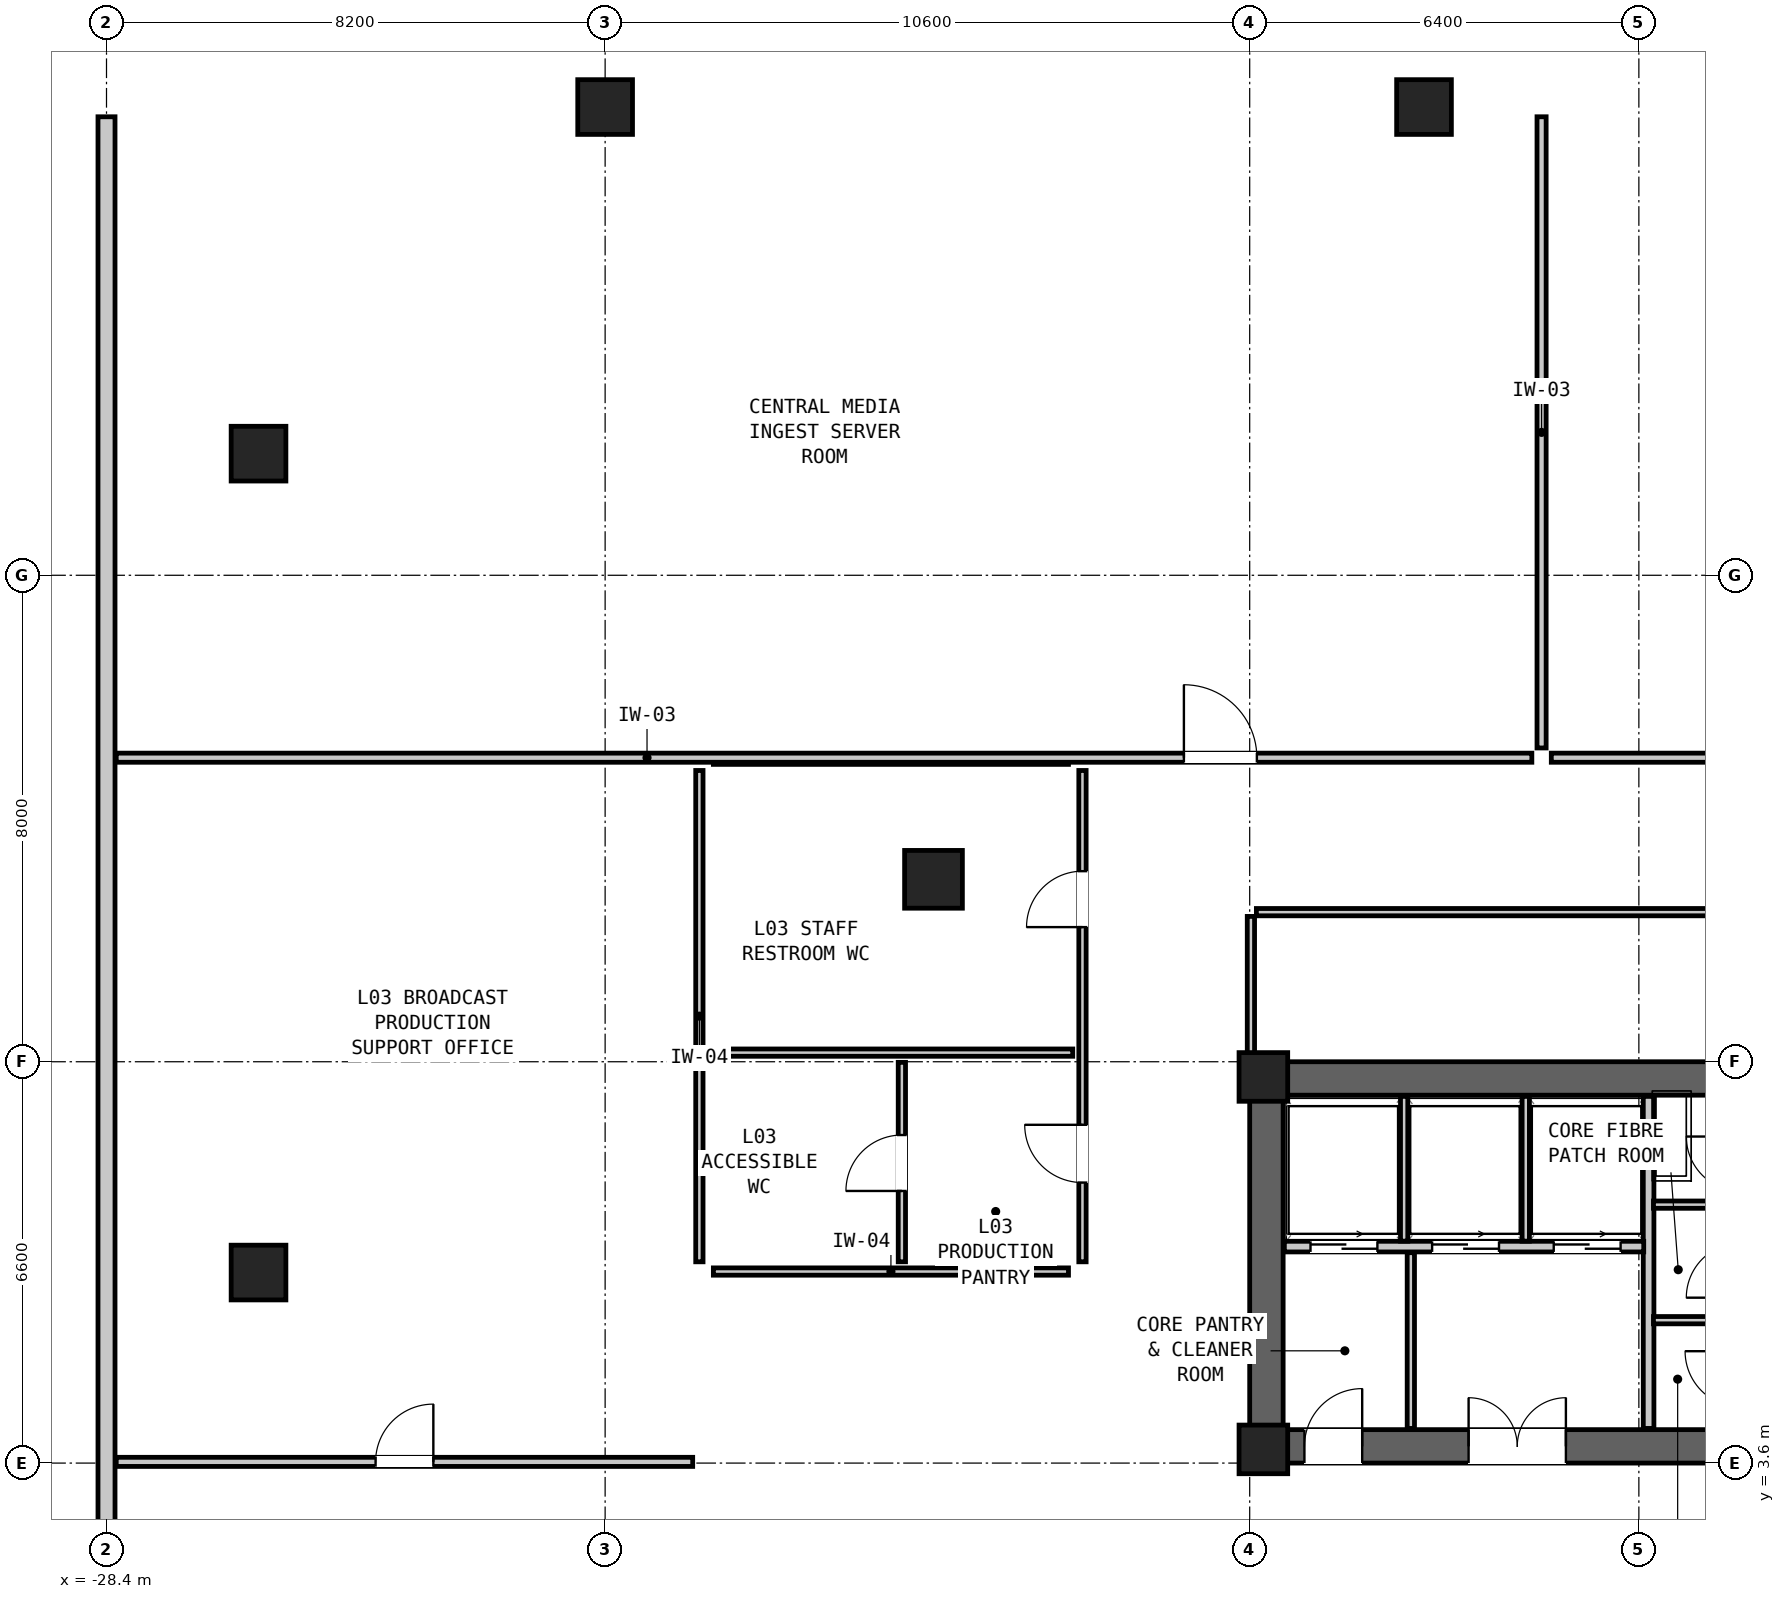
"""IFC4 building model, lengths in metres.
Left out: names, types, materials, properties, quantities, classifications, styles, units other than length and angle.
Written with IfcOpenShell. Run it as: python <this file> out.ifc"""

import sys

from ifc_helpers import new_model, si_unit, direction, frame, frame_2d, origin, origin_2d, place, context, subcontext, project, spatial, rectangle, hollow_rectangle, extrude, element, fill, save


model = new_model("IFC4")
c1 = context("Model", 3, precision=1e-05, world=origin(), true_north=direction((0.0, 1.0)))
c2 = subcontext(c1, "Body", "Model", "MODEL_VIEW")
j1 = project(units=[si_unit("LENGTHUNIT", "METRE"), si_unit("PLANEANGLEUNIT", "RADIAN")], contexts=[c1])
p1 = place(None, origin())
s1 = spatial("IfcSite", under=j1, at=p1, CompositionType="ELEMENT")
p2 = place(p1, origin())
s2 = spatial("IfcBuilding", under=s1, at=p2, CompositionType="ELEMENT")
p3 = place(p2, frame((0.0, 0.0, 13.5)))
s3 = spatial("IfcBuildingStorey", under=s2, at=p3, CompositionType="ELEMENT", Elevation=13.5)
p4 = place(p3, frame((-9.6, 9.925, 0.0), z_axis=(0.0, 0.0, 1.0), x_axis=(1.0, 0.0, 0.0)))
e1 = element("IfcWall", 1, at=p4, inside=s3, PredefinedType="SHEAR", context=c2, shape_type="SweptSolid", body=[
    extrude(rectangle(XDim=19.2, YDim=0.55, at=frame_2d((9.6, 0.0))), origin(), (0.0, 0.0, 1.0), 4.2),
])
p5 = place(p3, frame((-9.6, 3.875, 0.0), z_axis=(0.0, 0.0, 1.0), x_axis=(1.0, 0.0, 0.0)))
e2 = element("IfcWall", 2, at=p5, inside=s3, PredefinedType="SHEAR", context=c2, shape_type="SweptSolid", body=[
    extrude(rectangle(XDim=19.2, YDim=0.55, at=frame_2d((9.6, 0.0))), origin(), (0.0, 0.0, 1.0), 4.2),
])
p6 = place(p5, frame((14.2, 0.0, 0.0)))
e3 = element("IfcOpeningElement", 3, at=p6, cuts=e2, PredefinedType="OPENING", context=c2, shape_type="SweptSolid", body=[
    extrude(rectangle(XDim=1.1, YDim=2.08, at=frame_2d((0.55, 1.04))), frame((0.0, 0.287, 0.0), z_axis=(0.0, -1.0, 0.0), x_axis=(1.0, 0.0, 0.0)), (0.0, 0.0, 1.0), 0.574),
])
p7 = place(p5, frame((8.2, 0.0, 0.0)))
e4 = element("IfcOpeningElement", 4, at=p7, cuts=e2, PredefinedType="OPENING", context=c2, shape_type="SweptSolid", body=[
    extrude(rectangle(XDim=1.15, YDim=2.1, at=frame_2d((0.575, 1.05))), frame((0.0, 0.287, 0.0), z_axis=(0.0, -1.0, 0.0), x_axis=(1.0, 0.0, 0.0)), (0.0, 0.0, 1.0), 0.574),
])
p8 = place(p5, frame((0.9, 0.0, 0.0)))
e5 = element("IfcOpeningElement", 5, at=p8, cuts=e2, PredefinedType="OPENING", context=c2, shape_type="SweptSolid", body=[
    extrude(rectangle(XDim=0.95, YDim=2.1, at=frame_2d((0.475, 1.05))), frame((0.0, 0.287, 0.0), z_axis=(0.0, -1.0, 0.0), x_axis=(1.0, 0.0, 0.0)), (0.0, 0.0, 1.0), 0.574),
])
p9 = place(p5, frame((3.6, 0.0, 0.0)))
e6 = element("IfcOpeningElement", 6, at=p9, cuts=e2, PredefinedType="OPENING", context=c2, shape_type="SweptSolid", body=[
    extrude(rectangle(XDim=1.6, YDim=2.12, at=frame_2d((0.8, 1.06))), frame((0.0, 0.287, 0.0), z_axis=(0.0, -1.0, 0.0), x_axis=(1.0, 0.0, 0.0)), (0.0, 0.0, 1.0), 0.574),
])
p10 = place(p3, frame((-9.325, 3.6, 0.0), z_axis=(0.0, 0.0, 1.0), x_axis=(0.0, 1.0, 0.0)))
e7 = element("IfcWall", 7, at=p10, inside=s3, PredefinedType="SHEAR", context=c2, shape_type="SweptSolid", body=[
    extrude(rectangle(XDim=6.6, YDim=0.55, at=frame_2d((3.3, 0.0))), origin(), (0.0, 0.0, 1.0), 4.2),
])
p11 = place(p3, frame((-14.8, 13.2, 0.0), z_axis=(0.0, 0.0, 1.0), x_axis=(1.0, 0.0, 0.0)))
e8 = element("IfcColumn", 8, at=p11, inside=s3, PredefinedType="COLUMN", context=c2, shape_type="SweptSolid", body=[
    extrude(hollow_rectangle(XDim=0.95, YDim=0.95, WallThickness=0.06, at=origin_2d()), origin(), (0.0, 0.0, 1.0), 4.2),
])
for number, where, z_axis, x_axis in (
    (9, (-6.733, 25.9, 0.0), (0.0, 0.0, 1.0), (1.0, 0.0, 0.0)),
    (10, (-20.2, 25.9, 0.0), (0.0, 0.0, 1.0), (1.0, 0.0, 0.0)),
    (11, (-25.9, 20.2, 0.0), (0.0, 0.0, 1.0), (0.0, 1.0, 0.0)),
    (12, (-25.9, 6.733, 0.0), (0.0, 0.0, 1.0), (0.0, 1.0, 0.0)),
):
    element("IfcColumn", number, at=place(p3, frame(where, z_axis=z_axis, x_axis=x_axis)), inside=s3, PredefinedType="COLUMN", context=c2, shape_type="SweptSolid", body=[
        extrude(hollow_rectangle(XDim=0.9, YDim=0.9, WallThickness=0.055, at=origin_2d()), origin(), (0.0, 0.0, 1.0), 4.2),
    ])
for number, where, z_axis, x_axis in (
    (13, (-9.375, 9.95, 0.0), (0.0, 0.0, 1.0), (1.0, 0.0, 0.0)),
    (14, (-9.375, 3.825, 0.0), (0.0, 0.0, 1.0), (1.0, 0.0, 0.0)),
):
    element("IfcColumn", number, at=place(p3, frame(where, z_axis=z_axis, x_axis=x_axis)), inside=s3, PredefinedType="COLUMN", context=c2, shape_type="SweptSolid", body=[
        extrude(rectangle(XDim=0.8, YDim=0.8, at=origin_2d()), origin(), (0.0, 0.0, 1.0), 4.2),
    ])
p12 = place(p3, frame((-3.04, 4.17, 0.0), z_axis=(0.0, 0.0, 1.0), x_axis=(0.0, 1.0, 0.0)))
e15 = element("IfcWall", 15, at=p12, inside=s3, PredefinedType="PARTITIONING", context=c2, shape_type="SweptSolid", body=[
    extrude(rectangle(XDim=5.46, YDim=0.175, at=frame_2d((2.73, 0.0))), origin(), (0.0, 0.0, 1.0), 3.88),
])
for number, where, z_axis, x_axis in (
    (16, (-2.96, 5.95, 0.0), (0.0, 0.0, 1.0), (1.0, 0.0, 0.0)),
    (17, (-2.96, 7.85, 0.0), (0.0, 0.0, 1.0), (1.0, 0.0, 0.0)),
):
    element("IfcWall", number, at=place(p3, frame(where, z_axis=z_axis, x_axis=x_axis)), inside=s3, PredefinedType="PARTITIONING", context=c2, shape_type="SweptSolid", body=[
        extrude(rectangle(XDim=1.36, YDim=0.12, at=frame_2d((0.68, 0.0))), origin(), (0.0, 0.0, 1.0), 3.88),
    ])
p13 = place(p3, frame((-9.03, 7.16, 0.0), z_axis=(0.0, 0.0, 1.0), x_axis=(1.0, 0.0, 0.0)))
e18 = element("IfcWall", 18, at=p13, inside=s3, PredefinedType="PARTITIONING", context=c2, shape_type="SweptSolid", body=[
    extrude(rectangle(XDim=5.91, YDim=0.175, at=frame_2d((2.955, 0.0))), origin(), (0.0, 0.0, 1.0), 3.88),
])
p14 = place(p13, frame((0.43, 0.0, 0.0)))
e19 = element("IfcOpeningElement", 19, at=p14, cuts=e18, PredefinedType="OPENING", context=c2, shape_type="SweptSolid", body=[
    extrude(rectangle(XDim=1.1, YDim=2.06, at=frame_2d((0.55, 1.03))), frame((0.0, 0.1, 0.0), z_axis=(0.0, -1.0, 0.0), x_axis=(1.0, 0.0, 0.0)), (0.0, 0.0, 1.0), 0.199),
])
p15 = place(p13, frame((2.43, 0.0, 0.0)))
e20 = element("IfcOpeningElement", 20, at=p15, cuts=e18, PredefinedType="OPENING", context=c2, shape_type="SweptSolid", body=[
    extrude(rectangle(XDim=1.1, YDim=2.06, at=frame_2d((0.55, 1.03))), frame((0.0, 0.1, 0.0), z_axis=(0.0, -1.0, 0.0), x_axis=(1.0, 0.0, 0.0)), (0.0, 0.0, 1.0), 0.199),
])
p16 = place(p13, frame((4.43, 0.0, 0.0)))
e21 = element("IfcOpeningElement", 21, at=p16, cuts=e18, PredefinedType="OPENING", context=c2, shape_type="SweptSolid", body=[
    extrude(rectangle(XDim=1.1, YDim=2.06, at=frame_2d((0.55, 1.03))), frame((0.0, 0.1, 0.0), z_axis=(0.0, -1.0, 0.0), x_axis=(1.0, 0.0, 0.0)), (0.0, 0.0, 1.0), 0.199),
])
for number, where, z_axis, x_axis in (
    (22, (-7.06, 7.25, 0.0), (0.0, 0.0, 1.0), (0.0, 1.0, 0.0)),
    (23, (-5.06, 7.25, 0.0), (0.0, 0.0, 1.0), (0.0, 1.0, 0.0)),
):
    element("IfcWall", number, at=place(p3, frame(where, z_axis=z_axis, x_axis=x_axis)), inside=s3, PredefinedType="PARTITIONING", context=c2, shape_type="SweptSolid", body=[
        extrude(rectangle(XDim=2.38, YDim=0.12, at=frame_2d((1.19, 0.0))), origin(), (0.0, 0.0, 1.0), 3.88),
    ])
p17 = place(p3, frame((-6.95, 4.17, 0.0), z_axis=(0.0, 0.0, 1.0), x_axis=(0.0, 1.0, 0.0)))
e24 = element("IfcWall", 24, at=p17, inside=s3, PredefinedType="PARTITIONING", context=c2, shape_type="SweptSolid", body=[
    extrude(rectangle(XDim=2.89, YDim=0.12, at=frame_2d((1.445, 0.0))), origin(), (0.0, 0.0, 1.0), 3.88),
])
for number, where, z_axis, x_axis in (
    (25, (-18.42, 6.75, 0.0), (0.0, 0.0, 1.0), (1.0, 0.0, 0.0)),
    (26, (-18.42, 15.15, 0.0), (0.0, 0.0, 1.0), (1.0, 0.0, 0.0)),
):
    element("IfcWall", number, at=place(p3, frame(where, z_axis=z_axis, x_axis=x_axis)), inside=s3, PredefinedType="PARTITIONING", context=c2, shape_type="SweptSolid", body=[
        extrude(rectangle(XDim=5.84, YDim=0.12, at=frame_2d((2.92, 0.0))), origin(), (0.0, 0.0, 1.0), 3.88),
    ])
p18 = place(p3, frame((-18.65, 6.91, 0.0), z_axis=(0.0, 0.0, 1.0), x_axis=(0.0, 1.0, 0.0)))
e27 = element("IfcWall", 27, at=p18, inside=s3, PredefinedType="PARTITIONING", context=c2, shape_type="SweptSolid", body=[
    extrude(rectangle(XDim=8.08, YDim=0.12, at=frame_2d((4.04, 0.0))), origin(), (0.0, 0.0, 1.0), 3.88),
])
p19 = place(p3, frame((-18.49, 10.35, 0.0), z_axis=(0.0, 0.0, 1.0), x_axis=(1.0, 0.0, 0.0)))
e28 = element("IfcWall", 28, at=p19, inside=s3, PredefinedType="PARTITIONING", context=c2, shape_type="SweptSolid", body=[
    extrude(rectangle(XDim=5.98, YDim=0.12, at=frame_2d((2.99, 0.0))), origin(), (0.0, 0.0, 1.0), 3.88),
])
p20 = place(p3, frame((-15.32, 6.91, 0.0), z_axis=(0.0, 0.0, 1.0), x_axis=(0.0, 1.0, 0.0)))
e29 = element("IfcWall", 29, at=p20, inside=s3, PredefinedType="PARTITIONING", context=c2, shape_type="SweptSolid", body=[
    extrude(rectangle(XDim=3.28, YDim=0.12, at=frame_2d((1.64, 0.0))), origin(), (0.0, 0.0, 1.0), 3.88),
])
p21 = place(p20, frame((1.165, 0.0, 0.0)))
e30 = element("IfcOpeningElement", 30, at=p21, cuts=e29, PredefinedType="OPENING", context=c2, shape_type="SweptSolid", body=[
    extrude(rectangle(XDim=0.92, YDim=2.1, at=frame_2d((0.46, 1.05))), frame((0.0, 0.072, 0.0), z_axis=(0.0, -1.0, 0.0), x_axis=(1.0, 0.0, 0.0)), (0.0, 0.0, 1.0), 0.144),
])
p22 = place(p3, frame((-12.35, 6.91, 0.0), z_axis=(0.0, 0.0, 1.0), x_axis=(0.0, 1.0, 0.0)))
e31 = element("IfcWall", 31, at=p22, inside=s3, PredefinedType="PARTITIONING", context=c2, shape_type="SweptSolid", body=[
    extrude(rectangle(XDim=8.08, YDim=0.12, at=frame_2d((4.04, 0.0))), origin(), (0.0, 0.0, 1.0), 3.88),
])
p23 = place(p22, frame((1.303, 0.0, 0.0)))
e32 = element("IfcOpeningElement", 32, at=p23, cuts=e31, PredefinedType="OPENING", context=c2, shape_type="SweptSolid", body=[
    extrude(rectangle(XDim=0.95, YDim=2.1, at=frame_2d((0.475, 1.05))), frame((0.0, 0.072, 0.0), z_axis=(0.0, -1.0, 0.0), x_axis=(1.0, 0.0, 0.0)), (0.0, 0.0, 1.0), 0.144),
])
p24 = place(p22, frame((5.504, 0.0, 0.0)))
e33 = element("IfcOpeningElement", 33, at=p24, cuts=e31, PredefinedType="OPENING", context=c2, shape_type="SweptSolid", body=[
    extrude(rectangle(XDim=0.92, YDim=2.1, at=frame_2d((0.46, 1.05))), frame((0.0, 0.072, 0.0), z_axis=(0.0, -1.0, 0.0), x_axis=(1.0, 0.0, 0.0)), (0.0, 0.0, 1.0), 0.144),
])
p25 = place(p3, frame((-28.4, -25.74, 0.0), z_axis=(0.0, 0.0, 1.0), x_axis=(0.0, 1.0, 0.0)))
e34 = element("IfcWall", 34, at=p25, inside=s3, PredefinedType="MOVABLE", context=c2, shape_type="SweptSolid", body=[
    extrude(rectangle(XDim=51.48, YDim=0.28, at=frame_2d((25.74, 0.0))), origin(), (0.0, 0.0, 1.0), 3.88),
])
p26 = place(p25, frame((25.255, 0.0, 0.0)))
e35 = element("IfcOpeningElement", 35, at=p26, cuts=e34, PredefinedType="OPENING", context=c2, shape_type="SweptSolid", body=[
    extrude(rectangle(XDim=2.0, YDim=2.14, at=frame_2d((1.0, 1.07))), frame((0.0, 0.152, 0.0), z_axis=(0.0, -1.0, 0.0), x_axis=(1.0, 0.0, 0.0)), (0.0, 0.0, 1.0), 0.304),
])
p27 = place(p3, frame((-28.24, 15.2, 0.0), z_axis=(0.0, 0.0, 1.0), x_axis=(1.0, 0.0, 0.0)))
e36 = element("IfcWall", 36, at=p27, inside=s3, PredefinedType="PARTITIONING", context=c2, shape_type="SweptSolid", body=[
    extrude(rectangle(XDim=23.28, YDim=0.15, at=frame_2d((11.64, 0.0))), origin(), (0.0, 0.0, 1.0), 3.88),
])
p28 = place(p27, frame((17.558, 0.0, 0.0)))
e37 = element("IfcOpeningElement", 37, at=p28, cuts=e36, PredefinedType="OPENING", context=c2, shape_type="SweptSolid", body=[
    extrude(rectangle(XDim=1.2, YDim=2.1, at=frame_2d((0.6, 1.05))), frame((0.0, 0.087, 0.0), z_axis=(0.0, -1.0, 0.0), x_axis=(1.0, 0.0, 0.0)), (0.0, 0.0, 1.0), 0.174),
])
p29 = place(p3, frame((-4.64, 15.2, 0.0), z_axis=(0.0, 0.0, 1.0), x_axis=(1.0, 0.0, 0.0)))
e38 = element("IfcWall", 38, at=p29, inside=s3, PredefinedType="PARTITIONING", context=c2, shape_type="SweptSolid", body=[
    extrude(rectangle(XDim=24.88, YDim=0.15, at=frame_2d((12.44, 0.0))), origin(), (0.0, 0.0, 1.0), 3.88),
])
p30 = place(p29, frame((5.62, 0.0, 0.0)))
e39 = element("IfcOpeningElement", 39, at=p30, cuts=e38, PredefinedType="OPENING", context=c2, shape_type="SweptSolid", body=[
    extrude(rectangle(XDim=1.2, YDim=2.1, at=frame_2d((0.6, 1.05))), frame((0.0, 0.087, 0.0), z_axis=(0.0, -1.0, 0.0), x_axis=(1.0, 0.0, 0.0)), (0.0, 0.0, 1.0), 0.174),
])
p31 = place(p3, frame((-4.8, 15.36, 0.0), z_axis=(0.0, 0.0, 1.0), x_axis=(0.0, 1.0, 0.0)))
e40 = element("IfcWall", 40, at=p31, inside=s3, PredefinedType="PARTITIONING", context=c2, shape_type="SweptSolid", body=[
    extrude(rectangle(XDim=10.38, YDim=0.15, at=frame_2d((5.19, 0.0))), origin(), (0.0, 0.0, 1.0), 3.88),
])
p32 = place(p3, frame((-9.49, 12.66, 0.0), z_axis=(0.0, 0.0, 1.0), x_axis=(1.0, 0.0, 0.0)))
e41 = element("IfcWall", 41, at=p32, inside=s3, PredefinedType="PARTITIONING", context=c2, shape_type="SweptSolid", body=[
    extrude(rectangle(XDim=18.98, YDim=0.12, at=frame_2d((9.49, 0.0))), origin(), (0.0, 0.0, 1.0), 3.88),
])
p33 = place(p32, frame((9.015, 0.0, 0.0)))
e42 = element("IfcOpeningElement", 42, at=p33, cuts=e41, PredefinedType="OPENING", context=c2, shape_type="SweptSolid", body=[
    extrude(rectangle(XDim=0.9, YDim=2.05, at=frame_2d((0.45, 1.025))), frame((0.0, 0.072, 0.0), z_axis=(0.0, -1.0, 0.0), x_axis=(1.0, 0.0, 0.0)), (0.0, 0.0, 1.0), 0.144),
])
p34 = place(p3, frame((-9.58, 10.31, 0.0), z_axis=(0.0, 0.0, 1.0), x_axis=(0.0, 1.0, 0.0)))
e43 = element("IfcWall", 43, at=p34, inside=s3, PredefinedType="PARTITIONING", context=c2, shape_type="SweptSolid", body=[
    extrude(rectangle(XDim=2.28, YDim=0.12, at=frame_2d((1.14, 0.0))), origin(), (0.0, 0.0, 1.0), 3.88),
])
p35 = place(p3, frame((-28.24, 3.62, 0.0), z_axis=(0.0, 0.0, 1.0), x_axis=(1.0, 0.0, 0.0)))
e44 = element("IfcWall", 44, at=p35, inside=s3, PredefinedType="PARTITIONING", context=c2, shape_type="SweptSolid", body=[
    extrude(rectangle(XDim=9.48, YDim=0.15, at=frame_2d((4.74, 0.0))), origin(), (0.0, 0.0, 1.0), 2.742),
])
p36 = place(p35, frame((4.265, 0.0, 0.0)))
e45 = element("IfcOpeningElement", 45, at=p36, cuts=e44, PredefinedType="OPENING", context=c2, shape_type="SweptSolid", body=[
    extrude(rectangle(XDim=0.95, YDim=2.1, at=frame_2d((0.475, 1.05))), frame((0.0, 0.087, 0.0), z_axis=(0.0, -1.0, 0.0), x_axis=(1.0, 0.0, 0.0)), (0.0, 0.0, 1.0), 0.174),
])
p37 = place(p14, origin())
e46 = element("IfcDoor", 46, at=p37, inside=s3, OperationType="DOUBLE_DOOR_SLIDING", PredefinedType="DOOR", context=c2, shape_type="SweptSolid", body=[
    extrude(rectangle(XDim=1.1, YDim=2.06, at=frame_2d((0.55, 1.03))), frame((0.0, 0.025, 0.0), z_axis=(0.0, -1.0, 0.0), x_axis=(1.0, 0.0, 0.0)), (0.0, 0.0, 1.0), 0.05),
])
fill(e19, e46)
p38 = place(p15, origin())
e47 = element("IfcDoor", 47, at=p38, inside=s3, OperationType="DOUBLE_DOOR_SLIDING", PredefinedType="DOOR", context=c2, shape_type="SweptSolid", body=[
    extrude(rectangle(XDim=1.1, YDim=2.06, at=frame_2d((0.55, 1.03))), frame((0.0, 0.025, 0.0), z_axis=(0.0, -1.0, 0.0), x_axis=(1.0, 0.0, 0.0)), (0.0, 0.0, 1.0), 0.05),
])
fill(e20, e47)
p39 = place(p16, origin())
e48 = element("IfcDoor", 48, at=p39, inside=s3, OperationType="DOUBLE_DOOR_SLIDING", PredefinedType="DOOR", context=c2, shape_type="SweptSolid", body=[
    extrude(rectangle(XDim=1.1, YDim=2.06, at=frame_2d((0.55, 1.03))), frame((0.0, 0.025, 0.0), z_axis=(0.0, -1.0, 0.0), x_axis=(1.0, 0.0, 0.0)), (0.0, 0.0, 1.0), 0.05),
])
fill(e21, e48)
p40 = place(p8, origin())
e49 = element("IfcDoor", 49, at=p40, inside=s3, OperationType="SINGLE_SWING_RIGHT", PredefinedType="DOOR", context=c2, shape_type="SweptSolid", body=[
    extrude(rectangle(XDim=0.95, YDim=2.1, at=frame_2d((0.475, 1.05))), frame((0.0, 0.025, 0.0), z_axis=(0.0, -1.0, 0.0), x_axis=(1.0, 0.0, 0.0)), (0.0, 0.0, 1.0), 0.05),
])
fill(e5, e49)
p41 = place(p9, origin())
e50 = element("IfcDoor", 50, at=p41, inside=s3, OperationType="DOUBLE_DOOR_SINGLE_SWING", PredefinedType="DOOR", context=c2, shape_type="SweptSolid", body=[
    extrude(rectangle(XDim=1.6, YDim=2.12, at=frame_2d((0.8, 1.06))), frame((0.0, 0.025, 0.0), z_axis=(0.0, -1.0, 0.0), x_axis=(1.0, 0.0, 0.0)), (0.0, 0.0, 1.0), 0.05),
])
fill(e6, e50)
p42 = place(p21, origin())
e51 = element("IfcDoor", 51, at=p42, inside=s3, OperationType="SINGLE_SWING_LEFT", PredefinedType="DOOR", context=c2, shape_type="SweptSolid", body=[
    extrude(rectangle(XDim=0.92, YDim=2.1, at=frame_2d((0.46, 1.05))), frame((0.0, 0.025, 0.0), z_axis=(0.0, -1.0, 0.0), x_axis=(1.0, 0.0, 0.0)), (0.0, 0.0, 1.0), 0.05),
])
fill(e30, e51)
p43 = place(p23, origin())
e52 = element("IfcDoor", 52, at=p43, inside=s3, OperationType="SINGLE_SWING_RIGHT", PredefinedType="DOOR", context=c2, shape_type="SweptSolid", body=[
    extrude(rectangle(XDim=0.95, YDim=2.1, at=frame_2d((0.475, 1.05))), frame((0.0, 0.025, 0.0), z_axis=(0.0, -1.0, 0.0), x_axis=(1.0, 0.0, 0.0)), (0.0, 0.0, 1.0), 0.05),
])
fill(e32, e52)
p44 = place(p24, origin())
e53 = element("IfcDoor", 53, at=p44, inside=s3, OperationType="SINGLE_SWING_LEFT", PredefinedType="DOOR", context=c2, shape_type="SweptSolid", body=[
    extrude(rectangle(XDim=0.92, YDim=2.1, at=frame_2d((0.46, 1.05))), frame((0.0, 0.025, 0.0), z_axis=(0.0, -1.0, 0.0), x_axis=(1.0, 0.0, 0.0)), (0.0, 0.0, 1.0), 0.05),
])
fill(e33, e53)
p45 = place(p28, origin())
e54 = element("IfcDoor", 54, at=p45, inside=s3, OperationType="SINGLE_SWING_LEFT", PredefinedType="DOOR", context=c2, shape_type="SweptSolid", body=[
    extrude(rectangle(XDim=1.2, YDim=2.1, at=frame_2d((0.6, 1.05))), frame((0.0, 0.025, 0.0), z_axis=(0.0, -1.0, 0.0), x_axis=(1.0, 0.0, 0.0)), (0.0, 0.0, 1.0), 0.05),
])
fill(e37, e54)
p46 = place(p36, origin())
e55 = element("IfcDoor", 55, at=p46, inside=s3, OperationType="SINGLE_SWING_RIGHT", PredefinedType="DOOR", context=c2, shape_type="SweptSolid", body=[
    extrude(rectangle(XDim=0.95, YDim=2.1, at=frame_2d((0.475, 1.05))), frame((0.0, 0.025, 0.0), z_axis=(0.0, -1.0, 0.0), x_axis=(1.0, 0.0, 0.0)), (0.0, 0.0, 1.0), 0.05),
])
fill(e45, e55)
save(model, sys.argv[1])
